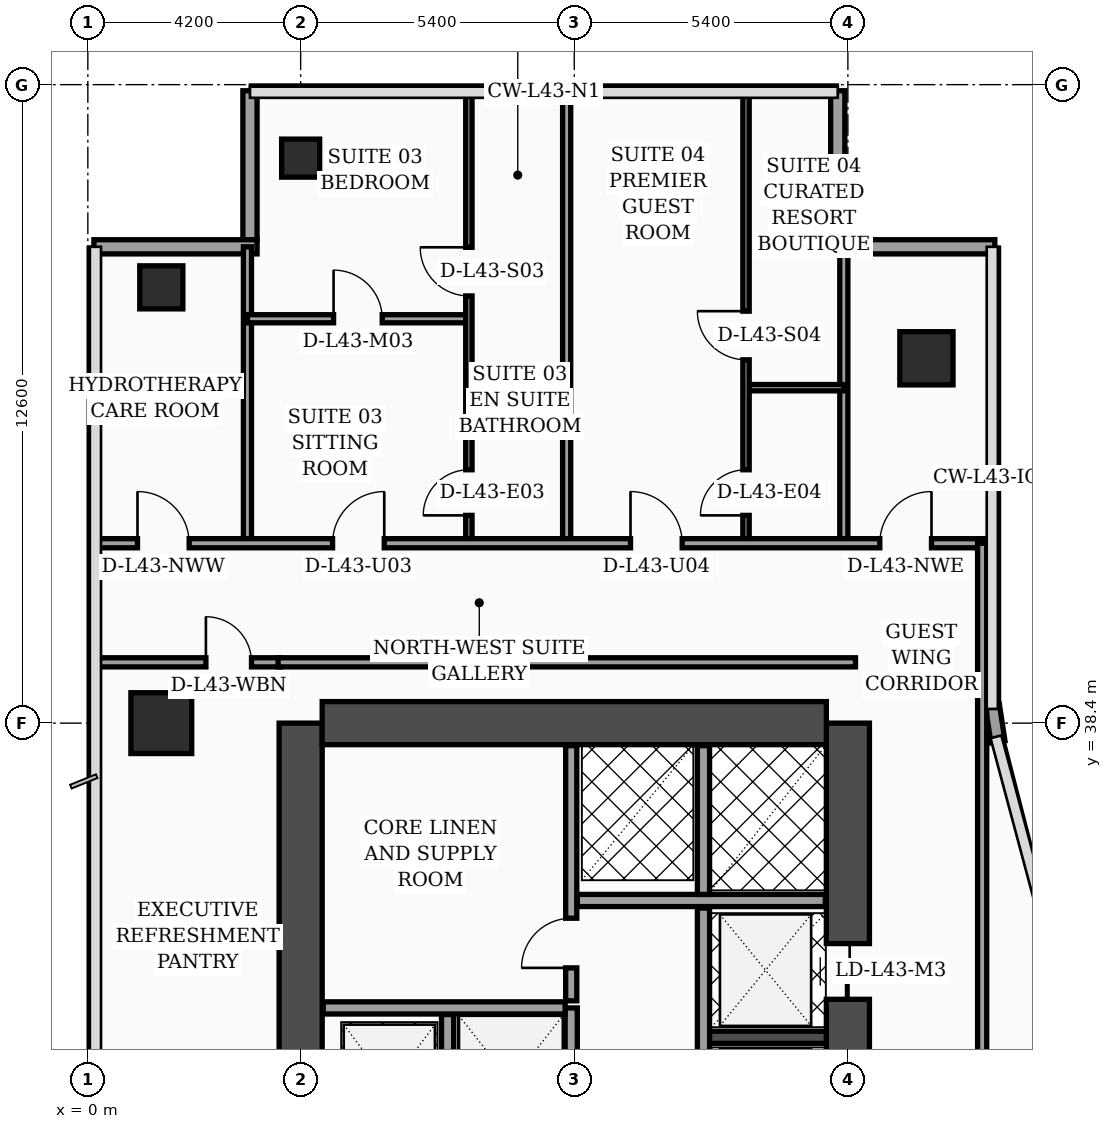
"""IFC4 building model, lengths in metres.
Left out: names, types, materials, properties, quantities, classifications, styles, units other than length and angle.
Written with IfcOpenShell. Run it as: python <this file> out.ifc"""

import sys

from ifc_helpers import new_model, si_unit, direction, frame, frame_2d, origin, origin_2d, place, context, subcontext, project, spatial, rectangle, hollow_rectangle, extrude, element, fill, save


model = new_model("IFC4")
c1 = context("Model", 3, precision=1e-05, world=origin(), true_north=direction((0.0, 1.0)))
c2 = subcontext(c1, "Body", "Model", "MODEL_VIEW")
j1 = project(units=[si_unit("LENGTHUNIT", "METRE"), si_unit("PLANEANGLEUNIT", "RADIAN")], contexts=[c1])
p1 = place(None, origin())
s1 = spatial("IfcSite", under=j1, at=p1, CompositionType="ELEMENT")
p2 = place(p1, origin())
s2 = spatial("IfcBuilding", under=s1, at=p2, CompositionType="ELEMENT")
p3 = place(p2, frame((0.0, 0.0, 175.1)))
s3 = spatial("IfcBuildingStorey", under=s2, at=p3, CompositionType="ELEMENT", Elevation=175.1)
p4 = place(p3, frame((4.2, 16.8, 0.0), z_axis=(0.0, 0.0, 1.0), x_axis=(0.0, 1.0, 0.0)))
e1 = element("IfcWall", 1, at=p4, inside=s3, PredefinedType="SHEAR", context=c2, shape_type="SweptSolid", body=[
    extrude(rectangle(XDim=21.6, YDim=0.85, at=frame_2d((10.8, 0.0))), origin(), (0.0, 0.0, 1.0), 3.56),
])
p5 = place(p3, frame((15.0, 16.8, 0.0), z_axis=(0.0, 0.0, 1.0), x_axis=(0.0, 1.0, 0.0)))
e2 = element("IfcWall", 2, at=p5, inside=s3, PredefinedType="SHEAR", context=c2, shape_type="SweptSolid", body=[
    extrude(rectangle(XDim=21.6, YDim=0.85, at=frame_2d((10.8, 0.0))), origin(), (0.0, 0.0, 1.0), 3.56),
])
p6 = place(p5, frame((8.65, 0.0, 0.0)))
e3 = element("IfcOpeningElement", 3, at=p6, cuts=e2, PredefinedType="OPENING", context=c2, shape_type="SweptSolid", body=[
    extrude(rectangle(XDim=1.1, YDim=2.2, at=frame_2d((0.55, 1.1))), frame((0.0, 0.435, 0.0), z_axis=(0.0, -1.0, 0.0), x_axis=(1.0, 0.0, 0.0)), (0.0, 0.0, 1.0), 0.87),
])
p7 = place(p5, frame((10.85, 0.0, 0.0)))
e4 = element("IfcOpeningElement", 4, at=p7, cuts=e2, PredefinedType="OPENING", context=c2, shape_type="SweptSolid", body=[
    extrude(rectangle(XDim=1.1, YDim=2.2, at=frame_2d((0.55, 1.1))), frame((0.0, 0.435, 0.0), z_axis=(0.0, -1.0, 0.0), x_axis=(1.0, 0.0, 0.0)), (0.0, 0.0, 1.0), 0.87),
])
p8 = place(p5, frame((13.5, 0.0, 0.0)))
e5 = element("IfcOpeningElement", 5, at=p8, cuts=e2, PredefinedType="OPENING", context=c2, shape_type="SweptSolid", body=[
    extrude(rectangle(XDim=1.1, YDim=2.2, at=frame_2d((0.55, 1.1))), frame((0.0, 0.435, 0.0), z_axis=(0.0, -1.0, 0.0), x_axis=(1.0, 0.0, 0.0)), (0.0, 0.0, 1.0), 0.87),
])
p9 = place(p5, frame((16.15, 0.0, 0.0)))
e6 = element("IfcOpeningElement", 6, at=p9, cuts=e2, PredefinedType="OPENING", context=c2, shape_type="SweptSolid", body=[
    extrude(rectangle(XDim=1.1, YDim=2.2, at=frame_2d((0.55, 1.1))), frame((0.0, 0.435, 0.0), z_axis=(0.0, -1.0, 0.0), x_axis=(1.0, 0.0, 0.0)), (0.0, 0.0, 1.0), 0.87),
])
p10 = place(p3, frame((4.625, 38.4, 0.0), z_axis=(0.0, 0.0, 1.0), x_axis=(1.0, 0.0, 0.0)))
e7 = element("IfcWall", 7, at=p10, inside=s3, PredefinedType="SHEAR", context=c2, shape_type="SweptSolid", body=[
    extrude(rectangle(XDim=9.95, YDim=0.85, at=frame_2d((4.975, 0.0))), origin(), (0.0, 0.0, 1.0), 3.56),
])
p11 = place(p3, frame((12.18, 32.2, 0.0), z_axis=(0.0, 0.0, 1.0), x_axis=(1.0, 0.0, 0.0)))
e8 = element("IfcWall", 8, at=p11, inside=s3, PredefinedType="SOLIDWALL", context=c2, shape_type="SweptSolid", body=[
    extrude(rectangle(XDim=2.395, YDim=0.24, at=frame_2d((1.198, 0.0))), origin(), (0.0, 0.0, 1.0), 3.56),
])
p12 = place(p3, frame((1.45, 38.4, 0.0), z_axis=(0.0, 0.0, 1.0), x_axis=(1.0, 0.0, 0.0)))
e9 = element("IfcColumn", 9, at=p12, inside=s3, PredefinedType="COLUMN", context=c2, shape_type="SweptSolid", body=[
    extrude(rectangle(XDim=1.2, YDim=1.2, at=origin_2d()), origin(), (0.0, 0.0, 1.0), 3.56),
])
p13 = place(p3, frame((1.45, 47.0, 0.0), z_axis=(0.0, 0.0, 1.0), x_axis=(1.0, 0.0, 0.0)))
e10 = element("IfcColumn", 10, at=p13, inside=s3, PredefinedType="COLUMN", context=c2, shape_type="SweptSolid", body=[
    extrude(hollow_rectangle(XDim=0.85, YDim=0.85, WallThickness=0.036, at=origin_2d()), origin(), (0.0, 0.0, 1.0), 3.56),
])
p14 = place(p3, frame((4.2, 49.55, 0.0), z_axis=(0.0, 0.0, 1.0), x_axis=(1.0, 0.0, 0.0)))
e11 = element("IfcColumn", 11, at=p14, inside=s3, PredefinedType="COLUMN", context=c2, shape_type="SweptSolid", body=[
    extrude(hollow_rectangle(XDim=0.75, YDim=0.75, WallThickness=0.032, at=origin_2d()), origin(), (0.0, 0.0, 1.0), 3.56),
])
p15 = place(p3, frame((16.55, 45.6, 0.0), z_axis=(0.0, 0.0, 1.0), x_axis=(1.0, 0.0, 0.0)))
e12 = element("IfcColumn", 12, at=p15, inside=s3, PredefinedType="COLUMN", context=c2, shape_type="SweptSolid", body=[
    extrude(rectangle(XDim=1.05, YDim=1.05, at=origin_2d()), origin(), (0.0, 0.0, 1.0), 3.56),
])
p16 = place(p3, frame((17.962, 38.03, 0.0), z_axis=(0.0, 0.0, 1.0), x_axis=(-0.15141125477, 0.988470855377, 0.0)))
e13 = element("IfcWall", 13, at=p16, inside=s3, PredefinedType="SOLIDWALL", context=c2, shape_type="SweptSolid", body=[
    extrude(rectangle(XDim=0.739, YDim=0.28, at=frame_2d((0.369, 0.0))), origin(), (0.0, 0.0, 1.0), 3.56),
])
p17 = place(p3, frame((17.9, 47.8, 0.0), z_axis=(0.0, 0.0, 1.0), x_axis=(-1.0, 0.0, 0.0)))
e14 = element("IfcWall", 14, at=p17, inside=s3, PredefinedType="SOLIDWALL", context=c2, shape_type="SweptSolid", body=[
    extrude(rectangle(XDim=3.24, YDim=0.28, at=frame_2d((1.62, 0.0))), origin(), (0.0, 0.0, 1.0), 3.56),
])
p18 = place(p3, frame((14.8, 47.94, 0.0), z_axis=(0.0, 0.0, 1.0), x_axis=(0.0, 1.0, 0.0)))
e15 = element("IfcWall", 15, at=p18, inside=s3, PredefinedType="SOLIDWALL", context=c2, shape_type="SweptSolid", body=[
    extrude(rectangle(XDim=2.94, YDim=0.28, at=frame_2d((1.47, 0.0))), origin(), (0.0, 0.0, 1.0), 3.56),
])
p19 = place(p3, frame((3.2, 50.88, 0.0), z_axis=(0.0, 0.0, 1.0), x_axis=(0.0, -1.0, 0.0)))
e16 = element("IfcWall", 16, at=p19, inside=s3, PredefinedType="SOLIDWALL", context=c2, shape_type="SweptSolid", body=[
    extrude(rectangle(XDim=2.94, YDim=0.28, at=frame_2d((1.47, 0.0))), origin(), (0.0, 0.0, 1.0), 3.04),
])
p20 = place(p3, frame((3.34, 47.8, 0.0), z_axis=(0.0, 0.0, 1.0), x_axis=(-1.0, 0.0, 0.0)))
e17 = element("IfcWall", 17, at=p20, inside=s3, PredefinedType="SOLIDWALL", context=c2, shape_type="SweptSolid", body=[
    extrude(rectangle(XDim=3.22, YDim=0.28, at=frame_2d((1.61, 0.0))), origin(), (0.0, 0.0, 1.0), 3.04),
])
p21 = place(p3, frame((7.1, 30.02, 0.0), z_axis=(0.0, 0.0, 1.0), x_axis=(0.0, 1.0, 0.0)))
e18 = element("IfcWall", 18, at=p21, inside=s3, PredefinedType="SOLIDWALL", context=c2, shape_type="SweptSolid", body=[
    extrude(rectangle(XDim=2.63, YDim=0.24, at=frame_2d((1.315, 0.0))), origin(), (0.0, 0.0, 1.0), 3.56),
])
p22 = place(p3, frame((9.54, 29.88, 0.0), z_axis=(0.0, 0.0, 1.0), x_axis=(0.0, 1.0, 0.0)))
e19 = element("IfcWall", 19, at=p22, inside=s3, PredefinedType="SOLIDWALL", context=c2, shape_type="SweptSolid", body=[
    extrude(rectangle(XDim=2.9, YDim=0.24, at=frame_2d((1.45, 0.0))), origin(), (0.0, 0.0, 1.0), 3.56),
])
p23 = place(p22, frame((0.7, 0.0, 0.0)))
e20 = element("IfcOpeningElement", 20, at=p23, cuts=e19, PredefinedType="OPENING", context=c2, shape_type="SweptSolid", body=[
    extrude(rectangle(XDim=1.3, YDim=2.35, at=frame_2d((0.65, 1.175))), frame((0.0, 0.13, 0.0), z_axis=(0.0, -1.0, 0.0), x_axis=(1.0, 0.0, 0.0)), (0.0, 0.0, 1.0), 0.26),
])
p24 = place(p3, frame((4.645, 32.78, 0.0), z_axis=(0.0, 0.0, 1.0), x_axis=(1.0, 0.0, 0.0)))
e21 = element("IfcWall", 21, at=p24, inside=s3, PredefinedType="SOLIDWALL", context=c2, shape_type="SweptSolid", body=[
    extrude(rectangle(XDim=4.775, YDim=0.24, at=frame_2d((2.387, 0.0))), origin(), (0.0, 0.0, 1.0), 3.19),
])
p25 = place(p3, frame((9.54, 32.92, 0.0), z_axis=(0.0, 0.0, 1.0), x_axis=(0.0, 1.0, 0.0)))
e22 = element("IfcWall", 22, at=p25, inside=s3, PredefinedType="SOLIDWALL", context=c2, shape_type="SweptSolid", body=[
    extrude(rectangle(XDim=5.035, YDim=0.22, at=frame_2d((2.518, 0.0))), origin(), (0.0, 0.0, 1.0), 3.56),
])
p26 = place(p25, frame((0.65, 0.0, 0.0)))
e23 = element("IfcOpeningElement", 23, at=p26, cuts=e22, PredefinedType="OPENING", context=c2, shape_type="SweptSolid", body=[
    extrude(rectangle(XDim=0.98, YDim=2.15, at=frame_2d((0.49, 1.075))), frame((0.0, 0.12, 0.0), z_axis=(0.0, -1.0, 0.0), x_axis=(1.0, 0.0, 0.0)), (0.0, 0.0, 1.0), 0.24),
])
p27 = place(p3, frame((12.15, 27.0, 0.0), z_axis=(0.0, 0.0, 1.0), x_axis=(0.0, 1.0, 0.0)))
e24 = element("IfcWall", 24, at=p27, inside=s3, PredefinedType="SOLIDWALL", context=c2, shape_type="SweptSolid", body=[
    extrude(rectangle(XDim=7.75, YDim=0.24, at=frame_2d((3.875, 0.0))), origin(), (0.0, 0.0, 1.0), 3.56),
])
p28 = place(p3, frame((9.66, 34.9, 0.0), z_axis=(0.0, 0.0, 1.0), x_axis=(1.0, 0.0, 0.0)))
e25 = element("IfcWall", 25, at=p28, inside=s3, PredefinedType="SOLIDWALL", context=c2, shape_type="SweptSolid", body=[
    extrude(rectangle(XDim=4.895, YDim=0.24, at=frame_2d((2.448, 0.0))), origin(), (0.0, 0.0, 1.0), 3.56),
])
p29 = place(p3, frame((12.15, 35.02, 0.0), z_axis=(0.0, 0.0, 1.0), x_axis=(0.0, 1.0, 0.0)))
e26 = element("IfcWall", 26, at=p29, inside=s3, PredefinedType="SOLIDWALL", context=c2, shape_type="SweptSolid", body=[
    extrude(rectangle(XDim=2.935, YDim=0.24, at=frame_2d((1.468, 0.0))), origin(), (0.0, 0.0, 1.0), 3.56),
])
p30 = place(p3, frame((0.08, 39.6, 0.0), z_axis=(0.0, 0.0, 1.0), x_axis=(1.0, 0.0, 0.0)))
e27 = element("IfcWall", 27, at=p30, inside=s3, PredefinedType="PARTITIONING", context=c2, shape_type="SweptSolid", body=[
    extrude(rectangle(XDim=3.725, YDim=0.18, at=frame_2d((1.862, 0.0))), origin(), (0.0, 0.0, 1.0), 2.94),
])
p31 = place(p30, frame((2.25, 0.0, 0.0)))
e28 = element("IfcOpeningElement", 28, at=p31, cuts=e27, PredefinedType="OPENING", context=c2, shape_type="SweptSolid", body=[
    extrude(rectangle(XDim=0.9, YDim=2.15, at=frame_2d((0.45, 1.075))), frame((0.0, 0.1, 0.0), z_axis=(0.0, -1.0, 0.0), x_axis=(1.0, 0.0, 0.0)), (0.0, 0.0, 1.0), 0.2),
])
p32 = place(p3, frame((3.15, 41.95, 0.0), z_axis=(0.0, 0.0, 1.0), x_axis=(0.0, 1.0, 0.0)))
e29 = element("IfcWall", 29, at=p32, inside=s3, PredefinedType="PARTITIONING", context=c2, shape_type="SweptSolid", body=[
    extrude(rectangle(XDim=5.85, YDim=0.16, at=frame_2d((2.925, 0.0))), origin(), (0.0, 0.0, 1.0), 3.14),
])
p33 = place(p3, frame((14.92, 41.95, 0.0), z_axis=(0.0, 0.0, 1.0), x_axis=(0.0, 1.0, 0.0)))
e30 = element("IfcWall", 30, at=p33, inside=s3, PredefinedType="PARTITIONING", context=c2, shape_type="SweptSolid", body=[
    extrude(rectangle(XDim=5.85, YDim=0.16, at=frame_2d((2.925, 0.0))), origin(), (0.0, 0.0, 1.0), 3.04),
])
p34 = place(p3, frame((7.52, 45.02, 0.0), z_axis=(0.0, 0.0, 1.0), x_axis=(1.0, 0.0, 0.0)))
e31 = element("IfcWall", 31, at=p34, inside=s3, PredefinedType="PARTITIONING", context=c2, shape_type="SweptSolid", body=[
    extrude(rectangle(XDim=1.93, YDim=0.125, at=frame_2d((0.965, 0.0))), origin(), (0.0, 0.0, 1.0), 3.56),
])
p35 = place(p3, frame((3.15, 46.38, 0.0), z_axis=(0.0, 0.0, 1.0), x_axis=(1.0, 0.0, 0.0)))
e32 = element("IfcWall", 32, at=p35, inside=s3, PredefinedType="PARTITIONING", context=c2, shape_type="SweptSolid", body=[
    extrude(rectangle(XDim=4.37, YDim=0.16, at=frame_2d((2.185, 0.0))), origin(), (0.0, 0.0, 1.0), 2.94),
])
p36 = place(p35, frame((1.7, 0.0, 0.0)))
e33 = element("IfcOpeningElement", 33, at=p36, cuts=e32, PredefinedType="OPENING", context=c2, shape_type="SweptSolid", body=[
    extrude(rectangle(XDim=0.96, YDim=2.2, at=frame_2d((0.48, 1.1))), frame((0.0, 0.09, 0.0), z_axis=(0.0, -1.0, 0.0), x_axis=(1.0, 0.0, 0.0)), (0.0, 0.0, 1.0), 0.18),
])
p37 = place(p3, frame((7.52, 41.95, 0.0), z_axis=(0.0, 0.0, 1.0), x_axis=(0.0, 1.0, 0.0)))
e34 = element("IfcWall", 34, at=p37, inside=s3, PredefinedType="PARTITIONING", context=c2, shape_type="SweptSolid", body=[
    extrude(rectangle(XDim=8.99, YDim=0.125, at=frame_2d((4.495, 0.0))), origin(), (0.0, 0.0, 1.0), 3.04),
])
p38 = place(p37, frame((0.55, 0.0, 0.0)))
e35 = element("IfcOpeningElement", 35, at=p38, cuts=e34, PredefinedType="OPENING", context=c2, shape_type="SweptSolid", body=[
    extrude(rectangle(XDim=0.9, YDim=2.15, at=frame_2d((0.45, 1.075))), frame((0.0, 0.073, 0.0), z_axis=(0.0, -1.0, 0.0), x_axis=(1.0, 0.0, 0.0)), (0.0, 0.0, 1.0), 0.145),
])
p39 = place(p37, frame((4.88, 0.0, 0.0)))
e36 = element("IfcOpeningElement", 36, at=p39, cuts=e34, PredefinedType="OPENING", context=c2, shape_type="SweptSolid", body=[
    extrude(rectangle(XDim=0.96, YDim=2.2, at=frame_2d((0.48, 1.1))), frame((0.0, 0.073, 0.0), z_axis=(0.0, -1.0, 0.0), x_axis=(1.0, 0.0, 0.0)), (0.0, 0.0, 1.0), 0.145),
])
p40 = place(p3, frame((12.99, 45.02, 0.0), z_axis=(0.0, 0.0, 1.0), x_axis=(1.0, 0.0, 0.0)))
e37 = element("IfcWall", 37, at=p40, inside=s3, PredefinedType="PARTITIONING", context=c2, shape_type="SweptSolid", body=[
    extrude(rectangle(XDim=1.93, YDim=0.125, at=frame_2d((0.965, 0.0))), origin(), (0.0, 0.0, 1.0), 3.56),
])
p41 = place(p3, frame((12.99, 41.95, 0.0), z_axis=(0.0, 0.0, 1.0), x_axis=(0.0, 1.0, 0.0)))
e38 = element("IfcWall", 38, at=p41, inside=s3, PredefinedType="PARTITIONING", context=c2, shape_type="SweptSolid", body=[
    extrude(rectangle(XDim=8.99, YDim=0.125, at=frame_2d((4.495, 0.0))), origin(), (0.0, 0.0, 1.0), 3.04),
])
p42 = place(p41, frame((0.55, 0.0, 0.0)))
e39 = element("IfcOpeningElement", 39, at=p42, cuts=e38, PredefinedType="OPENING", context=c2, shape_type="SweptSolid", body=[
    extrude(rectangle(XDim=0.9, YDim=2.15, at=frame_2d((0.45, 1.075))), frame((0.0, 0.073, 0.0), z_axis=(0.0, -1.0, 0.0), x_axis=(1.0, 0.0, 0.0)), (0.0, 0.0, 1.0), 0.145),
])
p43 = place(p41, frame((3.62, 0.0, 0.0)))
e40 = element("IfcOpeningElement", 40, at=p43, cuts=e38, PredefinedType="OPENING", context=c2, shape_type="SweptSolid", body=[
    extrude(rectangle(XDim=0.96, YDim=2.2, at=frame_2d((0.48, 1.1))), frame((0.0, 0.073, 0.0), z_axis=(0.0, -1.0, 0.0), x_axis=(1.0, 0.0, 0.0)), (0.0, 0.0, 1.0), 0.145),
])
p44 = place(p3, frame((9.45, 41.95, 0.0), z_axis=(0.0, 0.0, 1.0), x_axis=(0.0, 1.0, 0.0)))
e41 = element("IfcWall", 41, at=p44, inside=s3, PredefinedType="PARTITIONING", context=c2, shape_type="SweptSolid", body=[
    extrude(rectangle(XDim=8.99, YDim=0.16, at=frame_2d((4.495, 0.0))), origin(), (0.0, 0.0, 1.0), 3.04),
])
p45 = place(p3, frame((0.08, 41.95, 0.0), z_axis=(0.0, 0.0, 1.0), x_axis=(1.0, 0.0, 0.0)))
e42 = element("IfcWall", 42, at=p45, inside=s3, PredefinedType="PARTITIONING", context=c2, shape_type="SweptSolid", body=[
    extrude(rectangle(XDim=17.77, YDim=0.18, at=frame_2d((8.885, 0.0))), origin(), (0.0, 0.0, 1.0), 2.94),
])
p46 = place(p45, frame((0.9, 0.0, 0.0)))
e43 = element("IfcOpeningElement", 43, at=p46, cuts=e42, PredefinedType="OPENING", context=c2, shape_type="SweptSolid", body=[
    extrude(rectangle(XDim=1.02, YDim=2.2, at=frame_2d((0.51, 1.1))), frame((0.0, 0.1, 0.0), z_axis=(0.0, -1.0, 0.0), x_axis=(1.0, 0.0, 0.0)), (0.0, 0.0, 1.0), 0.2),
])
p47 = place(p45, frame((4.75, 0.0, 0.0)))
e44 = element("IfcOpeningElement", 44, at=p47, cuts=e42, PredefinedType="OPENING", context=c2, shape_type="SweptSolid", body=[
    extrude(rectangle(XDim=1.02, YDim=2.2, at=frame_2d((0.51, 1.1))), frame((0.0, 0.1, 0.0), z_axis=(0.0, -1.0, 0.0), x_axis=(1.0, 0.0, 0.0)), (0.0, 0.0, 1.0), 0.2),
])
p48 = place(p45, frame((10.63, 0.0, 0.0)))
e45 = element("IfcOpeningElement", 45, at=p48, cuts=e42, PredefinedType="OPENING", context=c2, shape_type="SweptSolid", body=[
    extrude(rectangle(XDim=1.02, YDim=2.2, at=frame_2d((0.51, 1.1))), frame((0.0, 0.1, 0.0), z_axis=(0.0, -1.0, 0.0), x_axis=(1.0, 0.0, 0.0)), (0.0, 0.0, 1.0), 0.2),
])
p49 = place(p45, frame((15.55, 0.0, 0.0)))
e46 = element("IfcOpeningElement", 46, at=p49, cuts=e42, PredefinedType="OPENING", context=c2, shape_type="SweptSolid", body=[
    extrude(rectangle(XDim=1.02, YDim=2.2, at=frame_2d((0.51, 1.1))), frame((0.0, 0.1, 0.0), z_axis=(0.0, -1.0, 0.0), x_axis=(1.0, 0.0, 0.0)), (0.0, 0.0, 1.0), 0.2),
])
p50 = place(p3, frame((17.65, 24.3, 0.0), z_axis=(0.0, 0.0, 1.0), x_axis=(0.0, 1.0, 0.0)))
e47 = element("IfcWall", 47, at=p50, inside=s3, PredefinedType="PARTITIONING", context=c2, shape_type="SweptSolid", body=[
    extrude(rectangle(XDim=17.65, YDim=0.18, at=frame_2d((8.825, 0.0))), origin(), (0.0, 0.0, 1.0), 2.94),
])
p51 = place(p3, frame((3.755, 39.6, 0.0), z_axis=(0.0, 0.0, 1.0), x_axis=(1.0, 0.0, 0.0)))
e48 = element("IfcWall", 48, at=p51, inside=s3, PredefinedType="PARTITIONING", context=c2, shape_type="SweptSolid", body=[
    extrude(rectangle(XDim=11.395, YDim=0.18, at=frame_2d((5.698, 0.0))), origin(), (0.0, 0.0, 1.0), 2.94),
])
p52 = place(p26, origin())
e49 = element("IfcDoor", 49, at=p52, inside=s3, OperationType="SINGLE_SWING_LEFT", PredefinedType="DOOR", context=c2, shape_type="SweptSolid", body=[
    extrude(rectangle(XDim=0.98, YDim=2.15, at=frame_2d((0.49, 1.075))), frame((0.0, 0.025, 0.0), z_axis=(0.0, -1.0, 0.0), x_axis=(1.0, 0.0, 0.0)), (0.0, 0.0, 1.0), 0.05),
])
fill(e23, e49)
p53 = place(p31, origin())
e50 = element("IfcDoor", 50, at=p53, inside=s3, OperationType="SINGLE_SWING_LEFT", PredefinedType="DOOR", context=c2, shape_type="SweptSolid", body=[
    extrude(rectangle(XDim=0.9, YDim=2.15, at=frame_2d((0.45, 1.075))), frame((0.0, 0.025, 0.0), z_axis=(0.0, -1.0, 0.0), x_axis=(1.0, 0.0, 0.0)), (0.0, 0.0, 1.0), 0.05),
])
fill(e28, e50)
p54 = place(p36, origin())
e51 = element("IfcDoor", 51, at=p54, inside=s3, OperationType="SINGLE_SWING_LEFT", PredefinedType="DOOR", context=c2, shape_type="SweptSolid", body=[
    extrude(rectangle(XDim=0.96, YDim=2.2, at=frame_2d((0.48, 1.1))), frame((0.0, 0.025, 0.0), z_axis=(0.0, -1.0, 0.0), x_axis=(1.0, 0.0, 0.0)), (0.0, 0.0, 1.0), 0.05),
])
fill(e33, e51)
p55 = place(p38, origin())
e52 = element("IfcDoor", 52, at=p55, inside=s3, OperationType="SINGLE_SWING_LEFT", PredefinedType="DOOR", context=c2, shape_type="SweptSolid", body=[
    extrude(rectangle(XDim=0.9, YDim=2.15, at=frame_2d((0.45, 1.075))), frame((0.0, 0.025, 0.0), z_axis=(0.0, -1.0, 0.0), x_axis=(1.0, 0.0, 0.0)), (0.0, 0.0, 1.0), 0.05),
])
fill(e35, e52)
p56 = place(p39, origin())
e53 = element("IfcDoor", 53, at=p56, inside=s3, OperationType="SINGLE_SWING_RIGHT", PredefinedType="DOOR", context=c2, shape_type="SweptSolid", body=[
    extrude(rectangle(XDim=0.96, YDim=2.2, at=frame_2d((0.48, 1.1))), frame((0.0, 0.025, 0.0), z_axis=(0.0, -1.0, 0.0), x_axis=(1.0, 0.0, 0.0)), (0.0, 0.0, 1.0), 0.05),
])
fill(e36, e53)
p57 = place(p42, origin())
e54 = element("IfcDoor", 54, at=p57, inside=s3, OperationType="SINGLE_SWING_LEFT", PredefinedType="DOOR", context=c2, shape_type="SweptSolid", body=[
    extrude(rectangle(XDim=0.9, YDim=2.15, at=frame_2d((0.45, 1.075))), frame((0.0, 0.025, 0.0), z_axis=(0.0, -1.0, 0.0), x_axis=(1.0, 0.0, 0.0)), (0.0, 0.0, 1.0), 0.05),
])
fill(e39, e54)
p58 = place(p43, origin())
e55 = element("IfcDoor", 55, at=p58, inside=s3, OperationType="SINGLE_SWING_RIGHT", PredefinedType="DOOR", context=c2, shape_type="SweptSolid", body=[
    extrude(rectangle(XDim=0.96, YDim=2.2, at=frame_2d((0.48, 1.1))), frame((0.0, 0.025, 0.0), z_axis=(0.0, -1.0, 0.0), x_axis=(1.0, 0.0, 0.0)), (0.0, 0.0, 1.0), 0.05),
])
fill(e40, e55)
p59 = place(p46, origin())
e56 = element("IfcDoor", 56, at=p59, inside=s3, OperationType="SINGLE_SWING_LEFT", PredefinedType="DOOR", context=c2, shape_type="SweptSolid", body=[
    extrude(rectangle(XDim=1.02, YDim=2.2, at=frame_2d((0.51, 1.1))), frame((0.0, 0.025, 0.0), z_axis=(0.0, -1.0, 0.0), x_axis=(1.0, 0.0, 0.0)), (0.0, 0.0, 1.0), 0.05),
])
fill(e43, e56)
p60 = place(p47, origin())
e57 = element("IfcDoor", 57, at=p60, inside=s3, OperationType="SINGLE_SWING_RIGHT", PredefinedType="DOOR", context=c2, shape_type="SweptSolid", body=[
    extrude(rectangle(XDim=1.02, YDim=2.2, at=frame_2d((0.51, 1.1))), frame((0.0, 0.025, 0.0), z_axis=(0.0, -1.0, 0.0), x_axis=(1.0, 0.0, 0.0)), (0.0, 0.0, 1.0), 0.05),
])
fill(e44, e57)
p61 = place(p48, origin())
e58 = element("IfcDoor", 58, at=p61, inside=s3, OperationType="SINGLE_SWING_LEFT", PredefinedType="DOOR", context=c2, shape_type="SweptSolid", body=[
    extrude(rectangle(XDim=1.02, YDim=2.2, at=frame_2d((0.51, 1.1))), frame((0.0, 0.025, 0.0), z_axis=(0.0, -1.0, 0.0), x_axis=(1.0, 0.0, 0.0)), (0.0, 0.0, 1.0), 0.05),
])
fill(e45, e58)
p62 = place(p49, origin())
e59 = element("IfcDoor", 59, at=p62, inside=s3, OperationType="SINGLE_SWING_RIGHT", PredefinedType="DOOR", context=c2, shape_type="SweptSolid", body=[
    extrude(rectangle(XDim=1.02, YDim=2.2, at=frame_2d((0.51, 1.1))), frame((0.0, 0.025, 0.0), z_axis=(0.0, -1.0, 0.0), x_axis=(1.0, 0.0, 0.0)), (0.0, 0.0, 1.0), 0.05),
])
fill(e46, e59)
p63 = place(p9, origin())
e60 = element("IfcDoor", 60, at=p63, inside=s3, OperationType="DOUBLE_DOOR_SLIDING", PredefinedType="DOOR", context=c2, shape_type="SweptSolid", body=[
    extrude(rectangle(XDim=1.1, YDim=2.2, at=frame_2d((0.55, 1.1))), frame((0.0, 0.025, 0.0), z_axis=(0.0, -1.0, 0.0), x_axis=(1.0, 0.0, 0.0)), (0.0, 0.0, 1.0), 0.05),
])
fill(e6, e60)
save(model, sys.argv[1])
